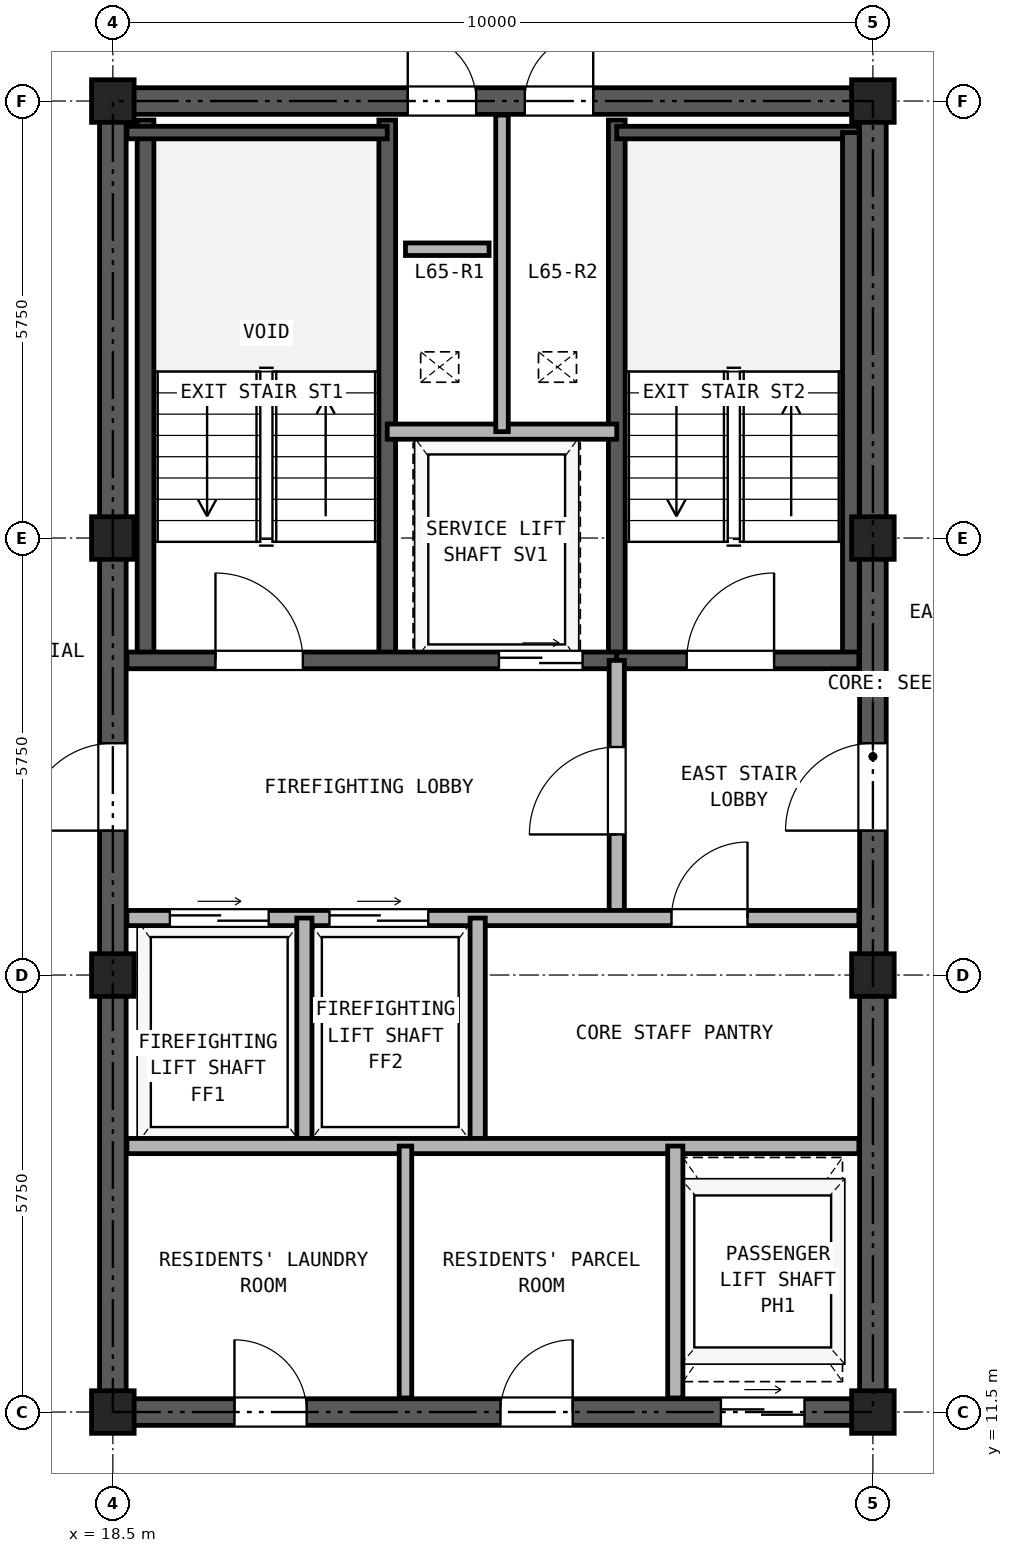
"""IFC4 building model, lengths in metres.
Left out: names, types, materials, properties, quantities, classifications, styles, units other than length and angle.
Written with IfcOpenShell. Run it as: python <this file> out.ifc"""

import sys

from ifc_helpers import new_model, si_unit, direction, frame, frame_2d, origin, origin_2d, place, context, subcontext, project, spatial, rectangle, hollow_rectangle, extrude, source, transform, mapped, element, fill, save


model = new_model("IFC4")
c1 = context("Model", 3, precision=1e-05, world=origin(), true_north=direction((0.0, 1.0)))
c2 = subcontext(c1, "Body", "Model", "MODEL_VIEW")
j1 = project(units=[si_unit("LENGTHUNIT", "METRE"), si_unit("PLANEANGLEUNIT", "RADIAN")], contexts=[c1])
p1 = place(None, origin())
s1 = spatial("IfcSite", under=j1, at=p1, CompositionType="ELEMENT")
p2 = place(p1, origin())
s2 = spatial("IfcBuilding", under=s1, at=p2, CompositionType="ELEMENT")
p3 = place(p2, frame((0.0, 0.0, 229.7)))
s3 = spatial("IfcBuildingStorey", under=s2, at=p3, CompositionType="ELEMENT", Elevation=229.7)
m1 = source(origin(), c2, "Body", "SweptSolid", [
    extrude(hollow_rectangle(XDim=0.56, YDim=0.56, WallThickness=0.03, at=origin_2d()), origin(), (0.0, 0.0, 1.0), 2.98),
])
for number, where, z_axis, x_axis in (
    (1, (18.5, 11.5, 0.0), (0.0, 0.0, 1.0), (1.0, 0.0, 0.0)),
    (2, (18.5, 17.25, 0.0), (0.0, 0.0, 1.0), (1.0, 0.0, 0.0)),
    (3, (18.5, 23.0, 0.0), (0.0, 0.0, 1.0), (1.0, 0.0, 0.0)),
    (4, (18.5, 28.75, 0.0), (0.0, 0.0, 1.0), (1.0, 0.0, 0.0)),
    (5, (28.5, 11.5, 0.0), (0.0, 0.0, 1.0), (1.0, 0.0, 0.0)),
    (6, (28.5, 17.25, 0.0), (0.0, 0.0, 1.0), (1.0, 0.0, 0.0)),
    (7, (28.5, 23.0, 0.0), (0.0, 0.0, 1.0), (1.0, 0.0, 0.0)),
    (8, (28.5, 28.75, 0.0), (0.0, 0.0, 1.0), (1.0, 0.0, 0.0)),
):
    element("IfcColumn", number, at=place(p3, frame(where, z_axis=z_axis, x_axis=x_axis)), inside=s3, PredefinedType="COLUMN", context=c2, shape_type="MappedRepresentation", body=[
        mapped(m1, transform((0.0, 0.0, 0.0), x_axis=(1.0, 0.0, 0.0), y_axis=(0.0, 1.0, 0.0), z_axis=(0.0, 0.0, 1.0), scale=1.0)),
    ])
p4 = place(p3, frame((18.325, 11.5, 0.0), z_axis=(0.0, 0.0, 1.0), x_axis=(1.0, 0.0, 0.0)))
e9 = element("IfcWall", 9, at=p4, inside=s3, PredefinedType="SHEAR", context=c2, shape_type="SweptSolid", body=[
    extrude(rectangle(XDim=10.35, YDim=0.35, at=frame_2d((5.175, 0.0))), origin(), (0.0, 0.0, 1.0), 2.98),
])
p5 = place(p4, frame((1.775, 0.0, 0.0)))
e10 = element("IfcOpeningElement", 10, at=p5, cuts=e9, PredefinedType="OPENING", context=c2, shape_type="SweptSolid", body=[
    extrude(rectangle(XDim=0.95, YDim=2.15, at=frame_2d((0.475, 1.075))), frame((0.0, 0.185, 0.0), z_axis=(0.0, -1.0, 0.0), x_axis=(1.0, 0.0, 0.0)), (0.0, 0.0, 1.0), 0.37),
])
p6 = place(p4, frame((5.275, 0.0, 0.0)))
e11 = element("IfcOpeningElement", 11, at=p6, cuts=e9, PredefinedType="OPENING", context=c2, shape_type="SweptSolid", body=[
    extrude(rectangle(XDim=0.95, YDim=2.15, at=frame_2d((0.475, 1.075))), frame((0.0, 0.185, 0.0), z_axis=(0.0, -1.0, 0.0), x_axis=(1.0, 0.0, 0.0)), (0.0, 0.0, 1.0), 0.37),
])
p7 = place(p4, frame((8.175, 0.0, 0.0)))
e12 = element("IfcOpeningElement", 12, at=p7, cuts=e9, PredefinedType="OPENING", context=c2, shape_type="SweptSolid", body=[
    extrude(rectangle(XDim=1.1, YDim=2.25, at=frame_2d((0.55, 1.125))), frame((0.0, 0.185, 0.0), z_axis=(0.0, -1.0, 0.0), x_axis=(1.0, 0.0, 0.0)), (0.0, 0.0, 1.0), 0.37),
])
p8 = place(p3, frame((18.325, 28.75, 0.0), z_axis=(0.0, 0.0, 1.0), x_axis=(1.0, 0.0, 0.0)))
e13 = element("IfcWall", 13, at=p8, inside=s3, PredefinedType="SHEAR", context=c2, shape_type="SweptSolid", body=[
    extrude(rectangle(XDim=10.35, YDim=0.35, at=frame_2d((5.175, 0.0))), origin(), (0.0, 0.0, 1.0), 2.98),
])
p9 = place(p8, frame((4.055, 0.0, 0.0)))
e14 = element("IfcOpeningElement", 14, at=p9, cuts=e13, PredefinedType="OPENING", context=c2, shape_type="SweptSolid", body=[
    extrude(rectangle(XDim=0.9, YDim=2.05, at=frame_2d((0.45, 1.025))), frame((0.0, 0.185, 0.0), z_axis=(0.0, -1.0, 0.0), x_axis=(1.0, 0.0, 0.0)), (0.0, 0.0, 1.0), 0.37),
])
p10 = place(p8, frame((5.595, 0.0, 0.0)))
e15 = element("IfcOpeningElement", 15, at=p10, cuts=e13, PredefinedType="OPENING", context=c2, shape_type="SweptSolid", body=[
    extrude(rectangle(XDim=0.9, YDim=2.05, at=frame_2d((0.45, 1.025))), frame((0.0, 0.185, 0.0), z_axis=(0.0, -1.0, 0.0), x_axis=(1.0, 0.0, 0.0)), (0.0, 0.0, 1.0), 0.37),
])
p11 = place(p3, frame((18.5, 11.675, 0.0), z_axis=(0.0, 0.0, 1.0), x_axis=(0.0, 1.0, 0.0)))
e16 = element("IfcWall", 16, at=p11, inside=s3, PredefinedType="SHEAR", context=c2, shape_type="SweptSolid", body=[
    extrude(rectangle(XDim=16.9, YDim=0.35, at=frame_2d((8.45, 0.0))), origin(), (0.0, 0.0, 1.0), 2.98),
])
p12 = place(p11, frame((7.475, 0.0, 0.0)))
e17 = element("IfcOpeningElement", 17, at=p12, cuts=e16, PredefinedType="OPENING", context=c2, shape_type="SweptSolid", body=[
    extrude(rectangle(XDim=1.15, YDim=2.2, at=frame_2d((0.575, 1.1))), frame((0.0, 0.185, 0.0), z_axis=(0.0, -1.0, 0.0), x_axis=(1.0, 0.0, 0.0)), (0.0, 0.0, 1.0), 0.37),
])
p13 = place(p3, frame((28.5, 11.675, 0.0), z_axis=(0.0, 0.0, 1.0), x_axis=(0.0, 1.0, 0.0)))
e18 = element("IfcWall", 18, at=p13, inside=s3, PredefinedType="SHEAR", context=c2, shape_type="SweptSolid", body=[
    extrude(rectangle(XDim=16.9, YDim=0.35, at=frame_2d((8.45, 0.0))), origin(), (0.0, 0.0, 1.0), 2.98),
])
p14 = place(p13, frame((7.475, 0.0, 0.0)))
e19 = element("IfcOpeningElement", 19, at=p14, cuts=e18, PredefinedType="OPENING", context=c2, shape_type="SweptSolid", body=[
    extrude(rectangle(XDim=1.15, YDim=2.2, at=frame_2d((0.575, 1.1))), frame((0.0, 0.185, 0.0), z_axis=(0.0, -1.0, 0.0), x_axis=(1.0, 0.0, 0.0)), (0.0, 0.0, 1.0), 0.37),
])
for number, where, z_axis, x_axis in (
    (20, (18.93, 21.39, 0.0), (0.0, 0.0, 1.0), (0.0, 1.0, 0.0)),
    (21, (22.11, 21.39, 0.0), (0.0, 0.0, 1.0), (0.0, 1.0, 0.0)),
    (22, (25.13, 21.39, 0.0), (0.0, 0.0, 1.0), (0.0, 1.0, 0.0)),
):
    element("IfcWall", number, at=place(p3, frame(where, z_axis=z_axis, x_axis=x_axis)), inside=s3, PredefinedType="SOLIDWALL", context=c2, shape_type="SweptSolid", body=[
        extrude(rectangle(XDim=7.11, YDim=0.22, at=frame_2d((3.555, 0.0))), origin(), (0.0, 0.0, 1.0), 2.98),
    ])
p15 = place(p3, frame((18.685, 28.335, 0.0), z_axis=(0.0, 0.0, 1.0), x_axis=(1.0, 0.0, 0.0)))
e23 = element("IfcWall", 23, at=p15, inside=s3, PredefinedType="PARTITIONING", context=c2, shape_type="SweptSolid", body=[
    extrude(rectangle(XDim=3.425, YDim=0.165, at=frame_2d((1.712, 0.0))), origin(), (0.0, 0.0, 1.0), 2.98),
])
p16 = place(p3, frame((25.13, 28.335, 0.0), z_axis=(0.0, 0.0, 1.0), x_axis=(1.0, 0.0, 0.0)))
e24 = element("IfcWall", 24, at=p16, inside=s3, PredefinedType="PARTITIONING", context=c2, shape_type="SweptSolid", body=[
    extrude(rectangle(XDim=3.185, YDim=0.165, at=frame_2d((1.593, 0.0))), origin(), (0.0, 0.0, 1.0), 2.98),
])
p17 = place(p3, frame((28.21, 21.39, 0.0), z_axis=(0.0, 0.0, 1.0), x_axis=(0.0, 1.0, 0.0)))
e25 = element("IfcWall", 25, at=p17, inside=s3, PredefinedType="SOLIDWALL", context=c2, shape_type="SweptSolid", body=[
    extrude(rectangle(XDim=6.945, YDim=0.22, at=frame_2d((3.473, 0.0))), origin(), (0.0, 0.0, 1.0), 2.98),
])
p18 = place(p3, frame((18.685, 21.39, 0.0), z_axis=(0.0, 0.0, 1.0), x_axis=(1.0, 0.0, 0.0)))
e26 = element("IfcWall", 26, at=p18, inside=s3, PredefinedType="SOLIDWALL", context=c2, shape_type="SweptSolid", body=[
    extrude(rectangle(XDim=6.445, YDim=0.22, at=frame_2d((3.222, 0.0))), origin(), (0.0, 0.0, 1.0), 2.98),
])
p19 = place(p18, frame((1.165, 0.0, 0.0)))
e27 = element("IfcOpeningElement", 27, at=p19, cuts=e26, PredefinedType="OPENING", context=c2, shape_type="SweptSolid", body=[
    extrude(rectangle(XDim=1.15, YDim=2.2, at=frame_2d((0.575, 1.1))), frame((0.0, 0.12, 0.0), z_axis=(0.0, -1.0, 0.0), x_axis=(1.0, 0.0, 0.0)), (0.0, 0.0, 1.0), 0.24),
])
p20 = place(p18, frame((4.895, 0.0, 0.0)))
e28 = element("IfcOpeningElement", 28, at=p20, cuts=e26, PredefinedType="OPENING", context=c2, shape_type="SweptSolid", body=[
    extrude(rectangle(XDim=1.1, YDim=2.25, at=frame_2d((0.55, 1.125))), frame((0.0, 0.12, 0.0), z_axis=(0.0, -1.0, 0.0), x_axis=(1.0, 0.0, 0.0)), (0.0, 0.0, 1.0), 0.24),
])
p21 = place(p3, frame((25.13, 21.39, 0.0), z_axis=(0.0, 0.0, 1.0), x_axis=(1.0, 0.0, 0.0)))
e29 = element("IfcWall", 29, at=p21, inside=s3, PredefinedType="SOLIDWALL", context=c2, shape_type="SweptSolid", body=[
    extrude(rectangle(XDim=3.185, YDim=0.22, at=frame_2d((1.593, 0.0))), origin(), (0.0, 0.0, 1.0), 2.98),
])
p22 = place(p21, frame((0.92, 0.0, 0.0)))
e30 = element("IfcOpeningElement", 30, at=p22, cuts=e29, PredefinedType="OPENING", context=c2, shape_type="SweptSolid", body=[
    extrude(rectangle(XDim=1.15, YDim=2.2, at=frame_2d((0.575, 1.1))), frame((0.0, 0.12, 0.0), z_axis=(0.0, -1.0, 0.0), x_axis=(1.0, 0.0, 0.0)), (0.0, 0.0, 1.0), 0.24),
])
p23 = place(p3, frame((22.11, 24.4, 0.0), z_axis=(0.0, 0.0, 1.0), x_axis=(1.0, 0.0, 0.0)))
e31 = element("IfcWall", 31, at=p23, inside=s3, PredefinedType="PARTITIONING", context=c2, shape_type="SweptSolid", body=[
    extrude(rectangle(XDim=3.02, YDim=0.2, at=frame_2d((1.51, 0.0))), origin(), (0.0, 0.0, 1.0), 2.98),
])
p24 = place(p3, frame((23.62, 24.4, 0.0), z_axis=(0.0, 0.0, 1.0), x_axis=(0.0, 1.0, 0.0)))
e32 = element("IfcWall", 32, at=p24, inside=s3, PredefinedType="PARTITIONING", context=c2, shape_type="SweptSolid", body=[
    extrude(rectangle(XDim=4.165, YDim=0.165, at=frame_2d((2.083, 0.0))), origin(), (0.0, 0.0, 1.0), 2.98),
])
p25 = place(p3, frame((25.13, 18.0, 0.0), z_axis=(0.0, 0.0, 1.0), x_axis=(0.0, 1.0, 0.0)))
e33 = element("IfcWall", 33, at=p25, inside=s3, PredefinedType="PARTITIONING", context=c2, shape_type="SweptSolid", body=[
    extrude(rectangle(XDim=3.39, YDim=0.2, at=frame_2d((1.695, 0.0))), origin(), (0.0, 0.0, 1.0), 2.98),
])
p26 = place(p25, frame((1.1, 0.0, 0.0)))
e34 = element("IfcOpeningElement", 34, at=p26, cuts=e33, PredefinedType="OPENING", context=c2, shape_type="SweptSolid", body=[
    extrude(rectangle(XDim=1.15, YDim=2.2, at=frame_2d((0.575, 1.1))), frame((0.0, 0.11, 0.0), z_axis=(0.0, -1.0, 0.0), x_axis=(1.0, 0.0, 0.0)), (0.0, 0.0, 1.0), 0.22),
])
p27 = place(p3, frame((18.685, 18.0, 0.0), z_axis=(0.0, 0.0, 1.0), x_axis=(1.0, 0.0, 0.0)))
e35 = element("IfcWall", 35, at=p27, inside=s3, PredefinedType="PARTITIONING", context=c2, shape_type="SweptSolid", body=[
    extrude(rectangle(XDim=9.63, YDim=0.2, at=frame_2d((4.815, 0.0))), origin(), (0.0, 0.0, 1.0), 2.98),
])
p28 = place(p27, frame((0.565, 0.0, 0.0)))
e36 = element("IfcOpeningElement", 36, at=p28, cuts=e35, PredefinedType="OPENING", context=c2, shape_type="SweptSolid", body=[
    extrude(rectangle(XDim=1.3, YDim=2.3, at=frame_2d((0.65, 1.15))), frame((0.0, 0.11, 0.0), z_axis=(0.0, -1.0, 0.0), x_axis=(1.0, 0.0, 0.0)), (0.0, 0.0, 1.0), 0.22),
])
p29 = place(p27, frame((2.665, 0.0, 0.0)))
e37 = element("IfcOpeningElement", 37, at=p29, cuts=e35, PredefinedType="OPENING", context=c2, shape_type="SweptSolid", body=[
    extrude(rectangle(XDim=1.3, YDim=2.3, at=frame_2d((0.65, 1.15))), frame((0.0, 0.11, 0.0), z_axis=(0.0, -1.0, 0.0), x_axis=(1.0, 0.0, 0.0)), (0.0, 0.0, 1.0), 0.22),
])
p30 = place(p27, frame((7.165, 0.0, 0.0)))
e38 = element("IfcOpeningElement", 38, at=p30, cuts=e35, PredefinedType="OPENING", context=c2, shape_type="SweptSolid", body=[
    extrude(rectangle(XDim=1.0, YDim=2.15, at=frame_2d((0.5, 1.075))), frame((0.0, 0.11, 0.0), z_axis=(0.0, -1.0, 0.0), x_axis=(1.0, 0.0, 0.0)), (0.0, 0.0, 1.0), 0.22),
])
for number, where, z_axis, x_axis in (
    (39, (21.02, 15.0, 0.0), (0.0, 0.0, 1.0), (0.0, 1.0, 0.0)),
    (40, (23.3, 15.0, 0.0), (0.0, 0.0, 1.0), (0.0, 1.0, 0.0)),
):
    element("IfcWall", number, at=place(p3, frame(where, z_axis=z_axis, x_axis=x_axis)), inside=s3, PredefinedType="PARTITIONING", context=c2, shape_type="SweptSolid", body=[
        extrude(rectangle(XDim=3.0, YDim=0.2, at=frame_2d((1.5, 0.0))), origin(), (0.0, 0.0, 1.0), 2.98),
    ])
p31 = place(p3, frame((18.685, 15.0, 0.0), z_axis=(0.0, 0.0, 1.0), x_axis=(1.0, 0.0, 0.0)))
e41 = element("IfcWall", 41, at=p31, inside=s3, PredefinedType="PARTITIONING", context=c2, shape_type="SweptSolid", body=[
    extrude(rectangle(XDim=9.63, YDim=0.2, at=frame_2d((4.815, 0.0))), origin(), (0.0, 0.0, 1.0), 2.98),
])
p32 = place(p3, frame((22.35, 11.685, 0.0), z_axis=(0.0, 0.0, 1.0), x_axis=(0.0, 1.0, 0.0)))
e42 = element("IfcWall", 42, at=p32, inside=s3, PredefinedType="PARTITIONING", context=c2, shape_type="SweptSolid", body=[
    extrude(rectangle(XDim=3.315, YDim=0.165, at=frame_2d((1.657, 0.0))), origin(), (0.0, 0.0, 1.0), 2.98),
])
p33 = place(p3, frame((25.9, 11.685, 0.0), z_axis=(0.0, 0.0, 1.0), x_axis=(0.0, 1.0, 0.0)))
e43 = element("IfcWall", 43, at=p33, inside=s3, PredefinedType="PARTITIONING", context=c2, shape_type="SweptSolid", body=[
    extrude(rectangle(XDim=3.315, YDim=0.2, at=frame_2d((1.657, 0.0))), origin(), (0.0, 0.0, 1.0), 2.98),
])
p34 = place(p3, frame((22.35, 26.8, 0.0), z_axis=(0.0, 0.0, 1.0), x_axis=(1.0, 0.0, 0.0)))
e44 = element("IfcWall", 44, at=p34, inside=s3, PredefinedType="PARTITIONING", context=c2, shape_type="SweptSolid", body=[
    extrude(rectangle(XDim=1.1, YDim=0.165, at=frame_2d((0.55, 0.0))), origin(), (0.0, 0.0, 1.0), 2.98),
])
p35 = place(p19, frame((1.15, 0.0, 0.0), z_axis=(0.0, 0.0, 1.0), x_axis=(-1.0, 0.0, 0.0)))
e45 = element("IfcDoor", 45, at=p35, inside=s3, OperationType="SINGLE_SWING_LEFT", PredefinedType="DOOR", context=c2, shape_type="SweptSolid", body=[
    extrude(rectangle(XDim=1.15, YDim=2.2, at=frame_2d((0.575, 1.1))), frame((0.0, 0.025, 0.0), z_axis=(0.0, -1.0, 0.0), x_axis=(1.0, 0.0, 0.0)), (0.0, 0.0, 1.0), 0.05),
])
fill(e27, e45)
p36 = place(p22, frame((1.15, 0.0, 0.0), z_axis=(0.0, 0.0, 1.0), x_axis=(-1.0, 0.0, 0.0)))
e46 = element("IfcDoor", 46, at=p36, inside=s3, OperationType="SINGLE_SWING_RIGHT", PredefinedType="DOOR", context=c2, shape_type="SweptSolid", body=[
    extrude(rectangle(XDim=1.15, YDim=2.2, at=frame_2d((0.575, 1.1))), frame((0.0, 0.025, 0.0), z_axis=(0.0, -1.0, 0.0), x_axis=(1.0, 0.0, 0.0)), (0.0, 0.0, 1.0), 0.05),
])
fill(e30, e46)
p37 = place(p20, frame((1.1, 0.0, 0.0), z_axis=(0.0, 0.0, 1.0), x_axis=(-1.0, 0.0, 0.0)))
e47 = element("IfcDoor", 47, at=p37, inside=s3, OperationType="DOUBLE_DOOR_SLIDING", PredefinedType="DOOR", context=c2, shape_type="SweptSolid", body=[
    extrude(rectangle(XDim=1.1, YDim=2.25, at=frame_2d((0.55, 1.125))), frame((0.0, 0.025, 0.0), z_axis=(0.0, -1.0, 0.0), x_axis=(1.0, 0.0, 0.0)), (0.0, 0.0, 1.0), 0.05),
])
fill(e28, e47)
p38 = place(p26, origin())
e48 = element("IfcDoor", 48, at=p38, inside=s3, OperationType="SINGLE_SWING_LEFT", PredefinedType="DOOR", context=c2, shape_type="SweptSolid", body=[
    extrude(rectangle(XDim=1.15, YDim=2.2, at=frame_2d((0.575, 1.1))), frame((0.0, 0.025, 0.0), z_axis=(0.0, -1.0, 0.0), x_axis=(1.0, 0.0, 0.0)), (0.0, 0.0, 1.0), 0.05),
])
fill(e34, e48)
p39 = place(p28, origin())
e49 = element("IfcDoor", 49, at=p39, inside=s3, OperationType="DOUBLE_DOOR_SLIDING", PredefinedType="DOOR", context=c2, shape_type="SweptSolid", body=[
    extrude(rectangle(XDim=1.3, YDim=2.3, at=frame_2d((0.65, 1.15))), frame((0.0, 0.025, 0.0), z_axis=(0.0, -1.0, 0.0), x_axis=(1.0, 0.0, 0.0)), (0.0, 0.0, 1.0), 0.05),
])
fill(e36, e49)
p40 = place(p29, origin())
e50 = element("IfcDoor", 50, at=p40, inside=s3, OperationType="DOUBLE_DOOR_SLIDING", PredefinedType="DOOR", context=c2, shape_type="SweptSolid", body=[
    extrude(rectangle(XDim=1.3, YDim=2.3, at=frame_2d((0.65, 1.15))), frame((0.0, 0.025, 0.0), z_axis=(0.0, -1.0, 0.0), x_axis=(1.0, 0.0, 0.0)), (0.0, 0.0, 1.0), 0.05),
])
fill(e37, e50)
p41 = place(p30, frame((1.0, 0.0, 0.0), z_axis=(0.0, 0.0, 1.0), x_axis=(-1.0, 0.0, 0.0)))
e51 = element("IfcDoor", 51, at=p41, inside=s3, OperationType="SINGLE_SWING_RIGHT", PredefinedType="DOOR", context=c2, shape_type="SweptSolid", body=[
    extrude(rectangle(XDim=1.0, YDim=2.15, at=frame_2d((0.5, 1.075))), frame((0.0, 0.025, 0.0), z_axis=(0.0, -1.0, 0.0), x_axis=(1.0, 0.0, 0.0)), (0.0, 0.0, 1.0), 0.05),
])
fill(e38, e51)
p42 = place(p12, frame((1.15, 0.0, 0.0), z_axis=(0.0, 0.0, 1.0), x_axis=(-1.0, 0.0, 0.0)))
e52 = element("IfcDoor", 52, at=p42, inside=s3, OperationType="SINGLE_SWING_LEFT", PredefinedType="DOOR", context=c2, shape_type="SweptSolid", body=[
    extrude(rectangle(XDim=1.15, YDim=2.2, at=frame_2d((0.575, 1.1))), frame((0.0, 0.025, 0.0), z_axis=(0.0, -1.0, 0.0), x_axis=(1.0, 0.0, 0.0)), (0.0, 0.0, 1.0), 0.05),
])
fill(e17, e52)
p43 = place(p14, origin())
e53 = element("IfcDoor", 53, at=p43, inside=s3, OperationType="SINGLE_SWING_LEFT", PredefinedType="DOOR", context=c2, shape_type="SweptSolid", body=[
    extrude(rectangle(XDim=1.15, YDim=2.2, at=frame_2d((0.575, 1.1))), frame((0.0, 0.025, 0.0), z_axis=(0.0, -1.0, 0.0), x_axis=(1.0, 0.0, 0.0)), (0.0, 0.0, 1.0), 0.05),
])
fill(e19, e53)
p44 = place(p9, origin())
e54 = element("IfcDoor", 54, at=p44, inside=s3, OperationType="SINGLE_SWING_LEFT", PredefinedType="DOOR", context=c2, shape_type="SweptSolid", body=[
    extrude(rectangle(XDim=0.9, YDim=2.05, at=frame_2d((0.45, 1.025))), frame((0.0, 0.025, 0.0), z_axis=(0.0, -1.0, 0.0), x_axis=(1.0, 0.0, 0.0)), (0.0, 0.0, 1.0), 0.05),
])
fill(e14, e54)
p45 = place(p10, origin())
e55 = element("IfcDoor", 55, at=p45, inside=s3, OperationType="SINGLE_SWING_RIGHT", PredefinedType="DOOR", context=c2, shape_type="SweptSolid", body=[
    extrude(rectangle(XDim=0.9, YDim=2.05, at=frame_2d((0.45, 1.025))), frame((0.0, 0.025, 0.0), z_axis=(0.0, -1.0, 0.0), x_axis=(1.0, 0.0, 0.0)), (0.0, 0.0, 1.0), 0.05),
])
fill(e15, e55)
p46 = place(p5, frame((0.95, 0.0, 0.0), z_axis=(0.0, 0.0, 1.0), x_axis=(-1.0, 0.0, 0.0)))
e56 = element("IfcDoor", 56, at=p46, inside=s3, OperationType="SINGLE_SWING_LEFT", PredefinedType="DOOR", context=c2, shape_type="SweptSolid", body=[
    extrude(rectangle(XDim=0.95, YDim=2.15, at=frame_2d((0.475, 1.075))), frame((0.0, 0.025, 0.0), z_axis=(0.0, -1.0, 0.0), x_axis=(1.0, 0.0, 0.0)), (0.0, 0.0, 1.0), 0.05),
])
fill(e10, e56)
p47 = place(p6, frame((0.95, 0.0, 0.0), z_axis=(0.0, 0.0, 1.0), x_axis=(-1.0, 0.0, 0.0)))
e57 = element("IfcDoor", 57, at=p47, inside=s3, OperationType="SINGLE_SWING_RIGHT", PredefinedType="DOOR", context=c2, shape_type="SweptSolid", body=[
    extrude(rectangle(XDim=0.95, YDim=2.15, at=frame_2d((0.475, 1.075))), frame((0.0, 0.025, 0.0), z_axis=(0.0, -1.0, 0.0), x_axis=(1.0, 0.0, 0.0)), (0.0, 0.0, 1.0), 0.05),
])
fill(e11, e57)
p48 = place(p7, frame((1.1, 0.0, 0.0), z_axis=(0.0, 0.0, 1.0), x_axis=(-1.0, 0.0, 0.0)))
e58 = element("IfcDoor", 58, at=p48, inside=s3, OperationType="DOUBLE_DOOR_SLIDING", PredefinedType="DOOR", context=c2, shape_type="SweptSolid", body=[
    extrude(rectangle(XDim=1.1, YDim=2.25, at=frame_2d((0.55, 1.125))), frame((0.0, 0.025, 0.0), z_axis=(0.0, -1.0, 0.0), x_axis=(1.0, 0.0, 0.0)), (0.0, 0.0, 1.0), 0.05),
])
fill(e12, e58)
save(model, sys.argv[1])
